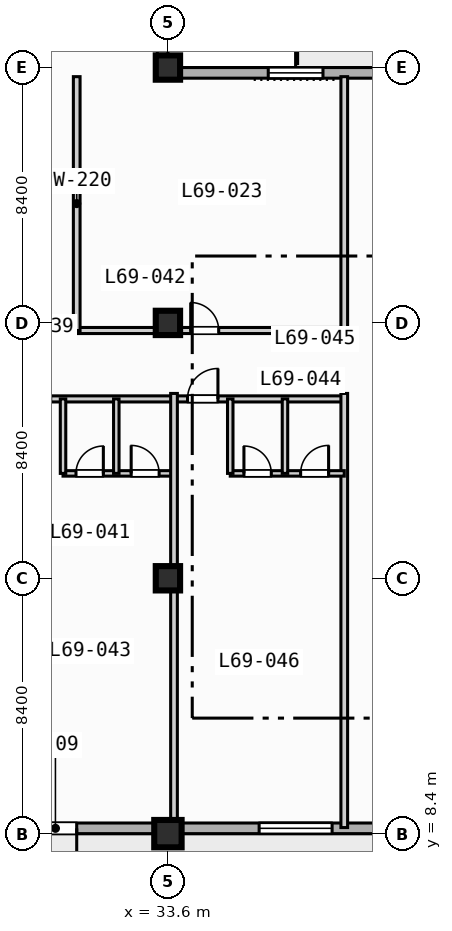
"""IFC4 building model, lengths in metres.
Left out: names, types, materials, properties, quantities, classifications, styles, units other than length and angle.
Written with IfcOpenShell. Run it as: python <this file> out.ifc"""

import sys

from ifc_helpers import new_model, si_unit, direction, frame, frame_2d, origin, origin_2d, place, context, subcontext, project, spatial, rectangle, extrude, element, fill, save


model = new_model("IFC4")
c1 = context("Model", 3, precision=1e-05, world=origin(), true_north=direction((0.0, 1.0)))
c2 = subcontext(c1, "Body", "Model", "MODEL_VIEW")
j1 = project(units=[si_unit("LENGTHUNIT", "METRE"), si_unit("PLANEANGLEUNIT", "RADIAN")], contexts=[c1])
p1 = place(None, origin())
s1 = spatial("IfcSite", under=j1, at=p1, CompositionType="ELEMENT")
p2 = place(p1, origin())
s2 = spatial("IfcBuilding", under=s1, at=p2, CompositionType="ELEMENT")
p3 = place(p2, frame((0.0, 0.0, 278.6)))
s3 = spatial("IfcBuildingStorey", under=s2, at=p3, CompositionType="ELEMENT", Elevation=278.6)
p4 = place(p3, frame((33.6, 8.4, 0.0), z_axis=(0.0, 0.0, 1.0), x_axis=(1.0, 0.0, 0.0)))
e1 = element("IfcColumn", 1, at=p4, inside=s3, PredefinedType="COLUMN", context=c2, shape_type="SweptSolid", body=[
    extrude(rectangle(XDim=0.9, YDim=0.9, at=origin_2d()), origin(), (0.0, 0.0, 1.0), 3.7),
])
for number, where, z_axis, x_axis in (
    (2, (33.6, 16.8, 0.0), (0.0, 0.0, 1.0), (1.0, 0.0, 0.0)),
    (3, (33.6, 25.2, 0.0), (0.0, 0.0, 1.0), (1.0, 0.0, 0.0)),
    (4, (33.6, 33.6, 0.0), (0.0, 0.0, 1.0), (1.0, 0.0, 0.0)),
):
    element("IfcColumn", number, at=place(p3, frame(where, z_axis=z_axis, x_axis=x_axis)), inside=s3, PredefinedType="COLUMN", context=c2, shape_type="SweptSolid", body=[
        extrude(rectangle(XDim=0.8, YDim=0.8, at=origin_2d()), origin(), (0.0, 0.0, 1.0), 3.7),
    ])
p5 = place(p3, frame((33.425, 72.425, 0.0), z_axis=(0.0, 0.0, 1.0), x_axis=(0.0, -1.0, 0.0)))
e5 = element("IfcWall", 5, at=p5, inside=s3, PredefinedType="STANDARD", context=c2, shape_type="SweptSolid", body=[
    extrude(rectangle(XDim=39.0, YDim=0.35, at=frame_2d((19.5, 0.0))), origin(), (0.0, 0.0, 1.0), 3.47),
])
p6 = place(p5, frame((5.9, 0.0, 0.85)))
e6 = element("IfcOpeningElement", 6, at=p6, cuts=e5, PredefinedType="OPENING", context=c2, shape_type="SweptSolid", body=[
    extrude(rectangle(XDim=1.8, YDim=1.8, at=frame_2d((0.9, 0.9))), frame((0.0, 0.185, 0.0), z_axis=(0.0, -1.0, 0.0), x_axis=(1.0, 0.0, 0.0)), (0.0, 0.0, 1.0), 0.37),
])
p7 = place(p3, frame((33.425, 33.425, 0.0), z_axis=(0.0, 0.0, 1.0), x_axis=(1.0, 0.0, 0.0)))
e7 = element("IfcWall", 7, at=p7, inside=s3, PredefinedType="STANDARD", context=c2, shape_type="SweptSolid", body=[
    extrude(rectangle(XDim=39.0, YDim=0.35, at=frame_2d((19.5, 0.0))), origin(), (0.0, 0.0, 1.0), 3.47),
])
p8 = place(p7, frame((12.075, 0.0, 0.0)))
e8 = element("IfcOpeningElement", 8, at=p8, cuts=e7, PredefinedType="OPENING", context=c2, shape_type="SweptSolid", body=[
    extrude(rectangle(XDim=1.4, YDim=2.2, at=frame_2d((0.7, 1.1))), frame((0.0, 0.185, 0.0), z_axis=(0.0, -1.0, 0.0), x_axis=(1.0, 0.0, 0.0)), (0.0, 0.0, 1.0), 0.37),
])
p9 = place(p7, frame((3.475, 0.0, 0.85)))
e9 = element("IfcOpeningElement", 9, at=p9, cuts=e7, PredefinedType="OPENING", context=c2, shape_type="SweptSolid", body=[
    extrude(rectangle(XDim=1.8, YDim=1.8, at=frame_2d((0.9, 0.9))), frame((0.0, 0.185, 0.0), z_axis=(0.0, -1.0, 0.0), x_axis=(1.0, 0.0, 0.0)), (0.0, 0.0, 1.0), 0.37),
])
p10 = place(p3, frame((72.425, 8.575, 0.0), z_axis=(0.0, 0.0, 1.0), x_axis=(-1.0, 0.0, 0.0)))
e10 = element("IfcWall", 10, at=p10, inside=s3, PredefinedType="STANDARD", context=c2, shape_type="SweptSolid", body=[
    extrude(rectangle(XDim=60.85, YDim=0.35, at=frame_2d((30.425, 0.0))), origin(), (0.0, 0.0, 1.0), 3.47),
])
p11 = place(p10, frame((41.825, 0.0, 0.0)))
e11 = element("IfcOpeningElement", 11, at=p11, cuts=e10, PredefinedType="OPENING", context=c2, shape_type="SweptSolid", body=[
    extrude(rectangle(XDim=1.4, YDim=2.2, at=frame_2d((0.7, 1.1))), frame((0.0, 0.185, 0.0), z_axis=(0.0, -1.0, 0.0), x_axis=(1.0, 0.0, 0.0)), (0.0, 0.0, 1.0), 0.37),
])
p12 = place(p10, frame((50.225, 0.0, 0.85)))
e12 = element("IfcOpeningElement", 12, at=p12, cuts=e10, PredefinedType="OPENING", context=c2, shape_type="SweptSolid", body=[
    extrude(rectangle(XDim=2.4, YDim=1.95, at=frame_2d((1.2, 0.975))), frame((0.0, 0.185, 0.0), z_axis=(0.0, -1.0, 0.0), x_axis=(1.0, 0.0, 0.0)), (0.0, 0.0, 1.0), 0.37),
])
p13 = place(p10, frame((33.425, 0.0, 0.85)))
e13 = element("IfcOpeningElement", 13, at=p13, cuts=e10, PredefinedType="OPENING", context=c2, shape_type="SweptSolid", body=[
    extrude(rectangle(XDim=2.4, YDim=1.95, at=frame_2d((1.2, 0.975))), frame((0.0, 0.185, 0.0), z_axis=(0.0, -1.0, 0.0), x_axis=(1.0, 0.0, 0.0)), (0.0, 0.0, 1.0), 0.37),
])
p14 = place(p10, frame((25.325, 0.0, 0.85)))
e14 = element("IfcOpeningElement", 14, at=p14, cuts=e10, PredefinedType="OPENING", context=c2, shape_type="SweptSolid", body=[
    extrude(rectangle(XDim=1.8, YDim=1.8, at=frame_2d((0.9, 0.9))), frame((0.0, 0.185, 0.0), z_axis=(0.0, -1.0, 0.0), x_axis=(1.0, 0.0, 0.0)), (0.0, 0.0, 1.0), 0.37),
])
p15 = place(p10, frame((56.975, 0.0, 0.85)))
e15 = element("IfcOpeningElement", 15, at=p15, cuts=e10, PredefinedType="OPENING", context=c2, shape_type="SweptSolid", body=[
    extrude(rectangle(XDim=1.8, YDim=1.8, at=frame_2d((0.9, 0.9))), frame((0.0, 0.185, 0.0), z_axis=(0.0, -1.0, 0.0), x_axis=(1.0, 0.0, 0.0)), (0.0, 0.0, 1.0), 0.37),
])
p16 = place(p10, frame((44.725, 0.0, 0.85)))
e16 = element("IfcOpeningElement", 16, at=p16, cuts=e10, PredefinedType="OPENING", context=c2, shape_type="SweptSolid", body=[
    extrude(rectangle(XDim=1.8, YDim=1.8, at=frame_2d((0.9, 0.9))), frame((0.0, 0.185, 0.0), z_axis=(0.0, -1.0, 0.0), x_axis=(1.0, 0.0, 0.0)), (0.0, 0.0, 1.0), 0.37),
])
p17 = place(p3, frame((30.6, 24.95, 0.0), z_axis=(0.0, 0.0, 1.0), x_axis=(1.0, 0.0, 0.0)))
e17 = element("IfcWall", 17, at=p17, inside=s3, PredefinedType="PARTITIONING", context=c2, shape_type="SweptSolid", body=[
    extrude(rectangle(XDim=8.8, YDim=0.2, at=frame_2d((4.4, 0.0))), origin(), (0.0, 0.0, 1.0), 2.82),
])
p18 = place(p17, frame((3.75, 0.0, 0.0)))
e18 = element("IfcOpeningElement", 18, at=p18, cuts=e17, PredefinedType="OPENING", context=c2, shape_type="SweptSolid", body=[
    extrude(rectangle(XDim=0.92, YDim=2.1, at=frame_2d((0.46, 1.05))), frame((0.0, 0.11, 0.0), z_axis=(0.0, -1.0, 0.0), x_axis=(1.0, 0.0, 0.0)), (0.0, 0.0, 1.0), 0.22),
])
for number, where, z_axis, x_axis in (
    (19, (30.6, 24.95, 0.0), (0.0, 0.0, 1.0), (0.0, 1.0, 0.0)),
    (20, (39.4, 24.95, 0.0), (0.0, 0.0, 1.0), (0.0, 1.0, 0.0)),
):
    element("IfcWall", number, at=place(p3, frame(where, z_axis=z_axis, x_axis=x_axis)), inside=s3, PredefinedType="PARTITIONING", context=c2, shape_type="SweptSolid", body=[
        extrude(rectangle(XDim=8.35, YDim=0.22, at=frame_2d((4.175, 0.0))), origin(), (0.0, 0.0, 1.0), 3.47),
    ])
p19 = place(p3, frame((11.8, 22.7, 0.0), z_axis=(0.0, 0.0, 1.0), x_axis=(1.0, 0.0, 0.0)))
e21 = element("IfcWall", 21, at=p19, inside=s3, PredefinedType="PARTITIONING", context=c2, shape_type="SweptSolid", body=[
    extrude(rectangle(XDim=27.6, YDim=0.2, at=frame_2d((13.8, 0.0))), origin(), (0.0, 0.0, 1.0), 3.47),
])
p20 = place(p19, frame((0.445, 0.0, 0.0)))
e22 = element("IfcOpeningElement", 22, at=p20, cuts=e21, PredefinedType="OPENING", context=c2, shape_type="SweptSolid", body=[
    extrude(rectangle(XDim=1.0, YDim=2.15, at=frame_2d((0.5, 1.075))), frame((0.0, 0.11, 0.0), z_axis=(0.0, -1.0, 0.0), x_axis=(1.0, 0.0, 0.0)), (0.0, 0.0, 1.0), 0.22),
])
p21 = place(p19, frame((5.945, 0.0, 0.0)))
e23 = element("IfcOpeningElement", 23, at=p21, cuts=e21, PredefinedType="OPENING", context=c2, shape_type="SweptSolid", body=[
    extrude(rectangle(XDim=1.0, YDim=2.15, at=frame_2d((0.5, 1.075))), frame((0.0, 0.11, 0.0), z_axis=(0.0, -1.0, 0.0), x_axis=(1.0, 0.0, 0.0)), (0.0, 0.0, 1.0), 0.22),
])
p22 = place(p19, frame((11.445, 0.0, 0.0)))
e24 = element("IfcOpeningElement", 24, at=p22, cuts=e21, PredefinedType="OPENING", context=c2, shape_type="SweptSolid", body=[
    extrude(rectangle(XDim=1.0, YDim=2.15, at=frame_2d((0.5, 1.075))), frame((0.0, 0.11, 0.0), z_axis=(0.0, -1.0, 0.0), x_axis=(1.0, 0.0, 0.0)), (0.0, 0.0, 1.0), 0.22),
])
p23 = place(p19, frame((16.945, 0.0, 0.0)))
e25 = element("IfcOpeningElement", 25, at=p23, cuts=e21, PredefinedType="OPENING", context=c2, shape_type="SweptSolid", body=[
    extrude(rectangle(XDim=1.0, YDim=2.15, at=frame_2d((0.5, 1.075))), frame((0.0, 0.11, 0.0), z_axis=(0.0, -1.0, 0.0), x_axis=(1.0, 0.0, 0.0)), (0.0, 0.0, 1.0), 0.22),
])
p24 = place(p19, frame((22.445, 0.0, 0.0)))
e26 = element("IfcOpeningElement", 26, at=p24, cuts=e21, PredefinedType="OPENING", context=c2, shape_type="SweptSolid", body=[
    extrude(rectangle(XDim=1.0, YDim=2.15, at=frame_2d((0.5, 1.075))), frame((0.0, 0.11, 0.0), z_axis=(0.0, -1.0, 0.0), x_axis=(1.0, 0.0, 0.0)), (0.0, 0.0, 1.0), 0.22),
])
p25 = place(p3, frame((30.15, 20.25, 0.0), z_axis=(0.0, 0.0, 1.0), x_axis=(1.0, 0.0, 0.0)))
e27 = element("IfcWall", 27, at=p25, inside=s3, PredefinedType="PLUMBINGWALL", context=c2, shape_type="SweptSolid", body=[
    extrude(rectangle(XDim=3.65, YDim=0.18, at=frame_2d((1.825, 0.0))), origin(), (0.0, 0.0, 1.0), 3.47),
])
p26 = place(p25, frame((0.426, 0.0, 0.0)))
e28 = element("IfcOpeningElement", 28, at=p26, cuts=e27, PredefinedType="OPENING", context=c2, shape_type="SweptSolid", body=[
    extrude(rectangle(XDim=0.9, YDim=2.1, at=frame_2d((0.45, 1.05))), frame((0.0, 0.1, 0.0), z_axis=(0.0, -1.0, 0.0), x_axis=(1.0, 0.0, 0.0)), (0.0, 0.0, 1.0), 0.2),
])
p27 = place(p25, frame((2.241, 0.0, 0.0)))
e29 = element("IfcOpeningElement", 29, at=p27, cuts=e27, PredefinedType="OPENING", context=c2, shape_type="SweptSolid", body=[
    extrude(rectangle(XDim=0.92, YDim=2.1, at=frame_2d((0.46, 1.05))), frame((0.0, 0.1, 0.0), z_axis=(0.0, -1.0, 0.0), x_axis=(1.0, 0.0, 0.0)), (0.0, 0.0, 1.0), 0.2),
])
for number, where, z_axis, x_axis in (
    (30, (30.15, 20.25, 0.0), (0.0, 0.0, 1.0), (0.0, 1.0, 0.0)),
    (31, (31.902, 20.25, 0.0), (0.0, 0.0, 1.0), (0.0, 1.0, 0.0)),
):
    element("IfcWall", number, at=place(p3, frame(where, z_axis=z_axis, x_axis=x_axis)), inside=s3, PredefinedType="PLUMBINGWALL", context=c2, shape_type="SweptSolid", body=[
        extrude(rectangle(XDim=2.45, YDim=0.18, at=frame_2d((1.225, 0.0))), origin(), (0.0, 0.0, 1.0), 3.47),
    ])
p28 = place(p3, frame((33.8, 8.6, 0.0), z_axis=(0.0, 0.0, 1.0), x_axis=(0.0, 1.0, 0.0)))
e32 = element("IfcWall", 32, at=p28, inside=s3, PredefinedType="PARTITIONING", context=c2, shape_type="SweptSolid", body=[
    extrude(rectangle(XDim=14.28, YDim=0.22, at=frame_2d((7.14, 0.0))), origin(), (0.0, 0.0, 1.0), 2.82),
])
p29 = place(p3, frame((39.4, 8.6, 0.0), z_axis=(0.0, 0.0, 1.0), x_axis=(0.0, 1.0, 0.0)))
e33 = element("IfcWall", 33, at=p29, inside=s3, PredefinedType="PARTITIONING", context=c2, shape_type="SweptSolid", body=[
    extrude(rectangle(XDim=14.28, YDim=0.22, at=frame_2d((7.14, 0.0))), origin(), (0.0, 0.0, 1.0), 3.47),
])
p30 = place(p3, frame((35.65, 20.25, 0.0), z_axis=(0.0, 0.0, 1.0), x_axis=(1.0, 0.0, 0.0)))
e34 = element("IfcWall", 34, at=p30, inside=s3, PredefinedType="PLUMBINGWALL", context=c2, shape_type="SweptSolid", body=[
    extrude(rectangle(XDim=3.75, YDim=0.18, at=frame_2d((1.875, 0.0))), origin(), (0.0, 0.0, 1.0), 3.47),
])
p31 = place(p30, frame((0.45, 0.0, 0.0)))
e35 = element("IfcOpeningElement", 35, at=p31, cuts=e34, PredefinedType="OPENING", context=c2, shape_type="SweptSolid", body=[
    extrude(rectangle(XDim=0.9, YDim=2.1, at=frame_2d((0.45, 1.05))), frame((0.0, 0.1, 0.0), z_axis=(0.0, -1.0, 0.0), x_axis=(1.0, 0.0, 0.0)), (0.0, 0.0, 1.0), 0.2),
])
p32 = place(p30, frame((2.315, 0.0, 0.0)))
e36 = element("IfcOpeningElement", 36, at=p32, cuts=e34, PredefinedType="OPENING", context=c2, shape_type="SweptSolid", body=[
    extrude(rectangle(XDim=0.92, YDim=2.1, at=frame_2d((0.46, 1.05))), frame((0.0, 0.1, 0.0), z_axis=(0.0, -1.0, 0.0), x_axis=(1.0, 0.0, 0.0)), (0.0, 0.0, 1.0), 0.2),
])
for number, where, z_axis, x_axis in (
    (37, (35.65, 20.25, 0.0), (0.0, 0.0, 1.0), (0.0, 1.0, 0.0)),
    (38, (37.45, 20.25, 0.0), (0.0, 0.0, 1.0), (0.0, 1.0, 0.0)),
):
    element("IfcWall", number, at=place(p3, frame(where, z_axis=z_axis, x_axis=x_axis)), inside=s3, PredefinedType="PLUMBINGWALL", context=c2, shape_type="SweptSolid", body=[
        extrude(rectangle(XDim=2.45, YDim=0.18, at=frame_2d((1.225, 0.0))), origin(), (0.0, 0.0, 1.0), 3.47),
    ])
p33 = place(p9, origin())
e39 = element("IfcWindow", 39, at=p33, inside=s3, PartitioningType="SINGLE_PANEL", PredefinedType="WINDOW", context=c2, shape_type="SweptSolid", body=[
    extrude(rectangle(XDim=1.8, YDim=1.8, at=frame_2d((0.9, 0.9))), frame((0.0, 0.03, 0.0), z_axis=(0.0, -1.0, 0.0), x_axis=(1.0, 0.0, 0.0)), (0.0, 0.0, 1.0), 0.06),
])
fill(e9, e39)
p34 = place(p11, origin())
e40 = element("IfcDoor", 40, at=p34, inside=s3, OperationType="SINGLE_SWING_LEFT", PredefinedType="DOOR", context=c2, shape_type="SweptSolid", body=[
    extrude(rectangle(XDim=1.4, YDim=2.2, at=frame_2d((0.7, 1.1))), frame((0.0, 0.025, 0.0), z_axis=(0.0, -1.0, 0.0), x_axis=(1.0, 0.0, 0.0)), (0.0, 0.0, 1.0), 0.05),
])
fill(e11, e40)
p35 = place(p13, origin())
e41 = element("IfcWindow", 41, at=p35, inside=s3, PartitioningType="SINGLE_PANEL", PredefinedType="WINDOW", context=c2, shape_type="SweptSolid", body=[
    extrude(rectangle(XDim=2.4, YDim=1.95, at=frame_2d((1.2, 0.975))), frame((0.0, 0.03, 0.0), z_axis=(0.0, -1.0, 0.0), x_axis=(1.0, 0.0, 0.0)), (0.0, 0.0, 1.0), 0.06),
])
fill(e13, e41)
p36 = place(p18, origin())
e42 = element("IfcDoor", 42, at=p36, inside=s3, OperationType="SINGLE_SWING_LEFT", PredefinedType="DOOR", context=c2, shape_type="SweptSolid", body=[
    extrude(rectangle(XDim=0.92, YDim=2.1, at=frame_2d((0.46, 1.05))), frame((0.0, 0.025, 0.0), z_axis=(0.0, -1.0, 0.0), x_axis=(1.0, 0.0, 0.0)), (0.0, 0.0, 1.0), 0.05),
])
fill(e18, e42)
p37 = place(p24, origin())
e43 = element("IfcDoor", 43, at=p37, inside=s3, OperationType="SINGLE_SWING_RIGHT", PredefinedType="DOOR", context=c2, shape_type="SweptSolid", body=[
    extrude(rectangle(XDim=1.0, YDim=2.15, at=frame_2d((0.5, 1.075))), frame((0.0, 0.025, 0.0), z_axis=(0.0, -1.0, 0.0), x_axis=(1.0, 0.0, 0.0)), (0.0, 0.0, 1.0), 0.05),
])
fill(e26, e43)
p38 = place(p26, origin())
e44 = element("IfcDoor", 44, at=p38, inside=s3, OperationType="SINGLE_SWING_RIGHT", PredefinedType="DOOR", context=c2, shape_type="SweptSolid", body=[
    extrude(rectangle(XDim=0.9, YDim=2.1, at=frame_2d((0.45, 1.05))), frame((0.0, 0.025, 0.0), z_axis=(0.0, -1.0, 0.0), x_axis=(1.0, 0.0, 0.0)), (0.0, 0.0, 1.0), 0.05),
])
fill(e28, e44)
p39 = place(p27, origin())
e45 = element("IfcDoor", 45, at=p39, inside=s3, OperationType="SINGLE_SWING_LEFT", PredefinedType="DOOR", context=c2, shape_type="SweptSolid", body=[
    extrude(rectangle(XDim=0.92, YDim=2.1, at=frame_2d((0.46, 1.05))), frame((0.0, 0.025, 0.0), z_axis=(0.0, -1.0, 0.0), x_axis=(1.0, 0.0, 0.0)), (0.0, 0.0, 1.0), 0.05),
])
fill(e29, e45)
p40 = place(p31, origin())
e46 = element("IfcDoor", 46, at=p40, inside=s3, OperationType="SINGLE_SWING_LEFT", PredefinedType="DOOR", context=c2, shape_type="SweptSolid", body=[
    extrude(rectangle(XDim=0.9, YDim=2.1, at=frame_2d((0.45, 1.05))), frame((0.0, 0.025, 0.0), z_axis=(0.0, -1.0, 0.0), x_axis=(1.0, 0.0, 0.0)), (0.0, 0.0, 1.0), 0.05),
])
fill(e35, e46)
p41 = place(p32, origin())
e47 = element("IfcDoor", 47, at=p41, inside=s3, OperationType="SINGLE_SWING_RIGHT", PredefinedType="DOOR", context=c2, shape_type="SweptSolid", body=[
    extrude(rectangle(XDim=0.92, YDim=2.1, at=frame_2d((0.46, 1.05))), frame((0.0, 0.025, 0.0), z_axis=(0.0, -1.0, 0.0), x_axis=(1.0, 0.0, 0.0)), (0.0, 0.0, 1.0), 0.05),
])
fill(e36, e47)
save(model, sys.argv[1])
